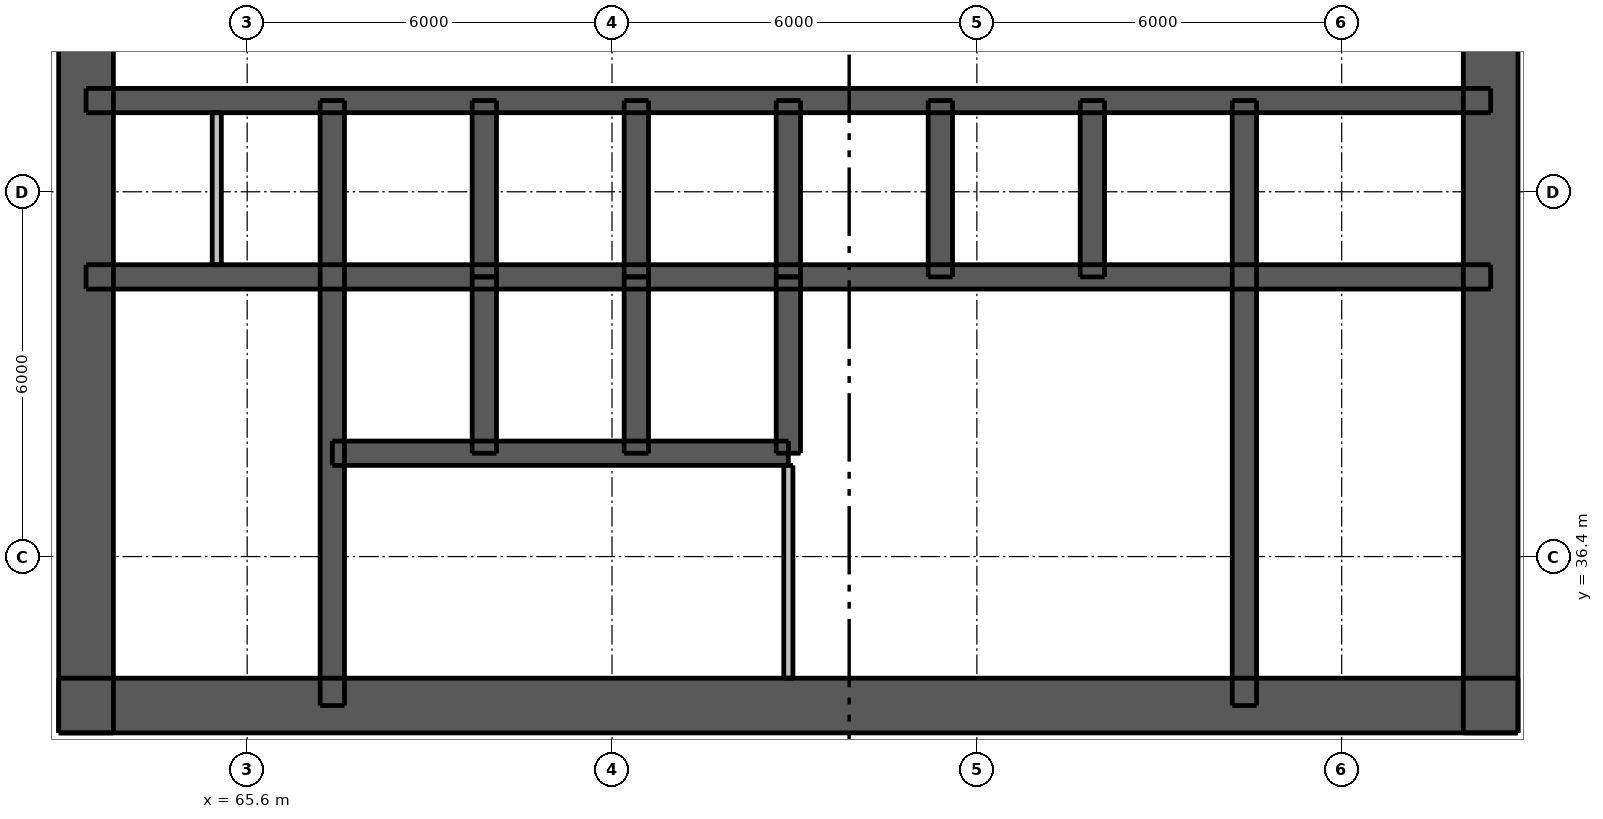
"""IFC4 building model, lengths in metres.
Left out: names, types, materials, properties, quantities, classifications, styles, units other than length and angle.
Written with IfcOpenShell. Run it as: python <this file> out.ifc"""

import sys

from ifc_helpers import new_model, si_unit, direction, frame, frame_2d, origin, place, context, subcontext, project, spatial, rectangle, extrude, element, fill, save


model = new_model("IFC4")
c1 = context("Model", 3, precision=1e-05, world=origin(), true_north=direction((0.0, 1.0)))
c2 = subcontext(c1, "Body", "Model", "MODEL_VIEW")
j1 = project(units=[si_unit("LENGTHUNIT", "METRE"), si_unit("PLANEANGLEUNIT", "RADIAN")], contexts=[c1])
p1 = place(None, origin())
s1 = spatial("IfcSite", under=j1, at=p1, CompositionType="ELEMENT")
p2 = place(p1, origin())
s2 = spatial("IfcBuilding", under=s1, at=p2, CompositionType="ELEMENT")
p3 = place(p2, frame((0.0, 0.0, 5.5)))
s3 = spatial("IfcBuildingStorey", under=s2, at=p3, CompositionType="ELEMENT", Elevation=5.5)
p4 = place(p3, frame((62.5, 33.95, 0.0), z_axis=(0.0, 0.0, 1.0), x_axis=(1.0, 0.0, 0.0)))
e1 = element("IfcWall", 1, at=p4, inside=s3, PredefinedType="SHEAR", context=c2, shape_type="SweptSolid", body=[
    extrude(rectangle(XDim=24.0, YDim=0.9, at=frame_2d((12.0, 0.0))), origin(), (0.0, 0.0, 1.0), 4.2),
])
p5 = place(p4, frame((2.05, 0.0, 0.0)))
e2 = element("IfcOpeningElement", 2, at=p5, cuts=e1, PredefinedType="OPENING", context=c2, shape_type="SweptSolid", body=[
    extrude(rectangle(XDim=1.1, YDim=2.1, at=frame_2d((0.55, 1.05))), frame((0.0, 0.46, 0.0), z_axis=(0.0, -1.0, 0.0), x_axis=(1.0, 0.0, 0.0)), (0.0, 0.0, 1.0), 0.92),
])
p6 = place(p4, frame((20.85, 0.0, 0.0)))
e3 = element("IfcOpeningElement", 3, at=p6, cuts=e1, PredefinedType="OPENING", context=c2, shape_type="SweptSolid", body=[
    extrude(rectangle(XDim=1.1, YDim=2.1, at=frame_2d((0.55, 1.05))), frame((0.0, 0.46, 0.0), z_axis=(0.0, -1.0, 0.0), x_axis=(1.0, 0.0, 0.0)), (0.0, 0.0, 1.0), 0.92),
])
p7 = place(p4, frame((8.0, 0.0, 0.0)))
e4 = element("IfcOpeningElement", 4, at=p7, cuts=e1, PredefinedType="OPENING", context=c2, shape_type="SweptSolid", body=[
    extrude(rectangle(XDim=1.1, YDim=2.1, at=frame_2d((0.55, 1.05))), frame((0.0, 0.46, 0.0), z_axis=(0.0, -1.0, 0.0), x_axis=(1.0, 0.0, 0.0)), (0.0, 0.0, 1.0), 0.92),
])
p8 = place(p4, frame((15.3, 0.0, 0.0)))
e5 = element("IfcOpeningElement", 5, at=p8, cuts=e1, PredefinedType="OPENING", context=c2, shape_type="SweptSolid", body=[
    extrude(rectangle(XDim=0.9, YDim=2.1, at=frame_2d((0.45, 1.05))), frame((0.0, 0.46, 0.0), z_axis=(0.0, -1.0, 0.0), x_axis=(1.0, 0.0, 0.0)), (0.0, 0.0, 1.0), 0.92),
])
p9 = place(p3, frame((62.95, 33.5, 0.0), z_axis=(0.0, 0.0, 1.0), x_axis=(0.0, 1.0, 0.0)))
e6 = element("IfcWall", 6, at=p9, inside=s3, PredefinedType="SHEAR", context=c2, shape_type="SweptSolid", body=[
    extrude(rectangle(XDim=24.0, YDim=0.9, at=frame_2d((12.0, 0.0))), origin(), (0.0, 0.0, 1.0), 4.2),
])
p10 = place(p9, frame((11.2, 0.0, 0.0)))
e7 = element("IfcOpeningElement", 7, at=p10, cuts=e6, PredefinedType="OPENING", context=c2, shape_type="SweptSolid", body=[
    extrude(rectangle(XDim=1.6, YDim=2.1, at=frame_2d((0.8, 1.05))), frame((0.0, 0.46, 0.0), z_axis=(0.0, -1.0, 0.0), x_axis=(1.0, 0.0, 0.0)), (0.0, 0.0, 1.0), 0.92),
])
p11 = place(p3, frame((86.05, 33.5, 0.0), z_axis=(0.0, 0.0, 1.0), x_axis=(0.0, 1.0, 0.0)))
e8 = element("IfcWall", 8, at=p11, inside=s3, PredefinedType="SHEAR", context=c2, shape_type="SweptSolid", body=[
    extrude(rectangle(XDim=24.0, YDim=0.9, at=frame_2d((12.0, 0.0))), origin(), (0.0, 0.0, 1.0), 4.2),
])
p12 = place(p11, frame((11.2, 0.0, 0.0)))
e9 = element("IfcOpeningElement", 9, at=p12, cuts=e8, PredefinedType="OPENING", context=c2, shape_type="SweptSolid", body=[
    extrude(rectangle(XDim=1.6, YDim=2.1, at=frame_2d((0.8, 1.05))), frame((0.0, 0.46, 0.0), z_axis=(0.0, -1.0, 0.0), x_axis=(1.0, 0.0, 0.0)), (0.0, 0.0, 1.0), 0.92),
])
p13 = place(p3, frame((62.95, 41.0, 0.0), z_axis=(0.0, 0.0, 1.0), x_axis=(1.0, 0.0, 0.0)))
e10 = element("IfcWall", 10, at=p13, inside=s3, PredefinedType="SHEAR", context=c2, shape_type="SweptSolid", body=[
    extrude(rectangle(XDim=23.1, YDim=0.4, at=frame_2d((11.55, 0.0))), origin(), (0.0, 0.0, 1.0), 4.2),
])
p14 = place(p3, frame((62.95, 43.9, 0.0), z_axis=(0.0, 0.0, 1.0), x_axis=(1.0, 0.0, 0.0)))
e11 = element("IfcWall", 11, at=p14, inside=s3, PredefinedType="SHEAR", context=c2, shape_type="SweptSolid", body=[
    extrude(rectangle(XDim=23.1, YDim=0.4, at=frame_2d((11.55, 0.0))), origin(), (0.0, 0.0, 1.0), 4.2),
])
p15 = place(p14, frame((0.85, 0.0, 0.0)))
e12 = element("IfcOpeningElement", 12, at=p15, cuts=e11, PredefinedType="OPENING", context=c2, shape_type="SweptSolid", body=[
    extrude(rectangle(XDim=0.9, YDim=2.1, at=frame_2d((0.45, 1.05))), frame((0.0, 0.21, 0.0), z_axis=(0.0, -1.0, 0.0), x_axis=(1.0, 0.0, 0.0)), (0.0, 0.0, 1.0), 0.42),
])
p16 = place(p14, frame((2.55, 0.0, 0.0)))
e13 = element("IfcOpeningElement", 13, at=p16, cuts=e11, PredefinedType="OPENING", context=c2, shape_type="SweptSolid", body=[
    extrude(rectangle(XDim=0.9, YDim=2.1, at=frame_2d((0.45, 1.05))), frame((0.0, 0.21, 0.0), z_axis=(0.0, -1.0, 0.0), x_axis=(1.0, 0.0, 0.0)), (0.0, 0.0, 1.0), 0.42),
])
p17 = place(p14, frame((20.5, 0.0, 0.0)))
e14 = element("IfcOpeningElement", 14, at=p17, cuts=e11, PredefinedType="OPENING", context=c2, shape_type="SweptSolid", body=[
    extrude(rectangle(XDim=0.9, YDim=2.1, at=frame_2d((0.45, 1.05))), frame((0.0, 0.21, 0.0), z_axis=(0.0, -1.0, 0.0), x_axis=(1.0, 0.0, 0.0)), (0.0, 0.0, 1.0), 0.42),
])
p18 = place(p14, frame((4.75, 0.0, 0.0)))
e15 = element("IfcOpeningElement", 15, at=p18, cuts=e11, PredefinedType="OPENING", context=c2, shape_type="SweptSolid", body=[
    extrude(rectangle(XDim=1.1, YDim=2.1, at=frame_2d((0.55, 1.05))), frame((0.0, 0.21, 0.0), z_axis=(0.0, -1.0, 0.0), x_axis=(1.0, 0.0, 0.0)), (0.0, 0.0, 1.0), 0.42),
])
p19 = place(p14, frame((7.25, 0.0, 0.0)))
e16 = element("IfcOpeningElement", 16, at=p19, cuts=e11, PredefinedType="OPENING", context=c2, shape_type="SweptSolid", body=[
    extrude(rectangle(XDim=1.1, YDim=2.1, at=frame_2d((0.55, 1.05))), frame((0.0, 0.21, 0.0), z_axis=(0.0, -1.0, 0.0), x_axis=(1.0, 0.0, 0.0)), (0.0, 0.0, 1.0), 0.42),
])
p20 = place(p14, frame((9.75, 0.0, 0.0)))
e17 = element("IfcOpeningElement", 17, at=p20, cuts=e11, PredefinedType="OPENING", context=c2, shape_type="SweptSolid", body=[
    extrude(rectangle(XDim=1.1, YDim=2.1, at=frame_2d((0.55, 1.05))), frame((0.0, 0.21, 0.0), z_axis=(0.0, -1.0, 0.0), x_axis=(1.0, 0.0, 0.0)), (0.0, 0.0, 1.0), 0.42),
])
p21 = place(p14, frame((12.25, 0.0, 0.0)))
e18 = element("IfcOpeningElement", 18, at=p21, cuts=e11, PredefinedType="OPENING", context=c2, shape_type="SweptSolid", body=[
    extrude(rectangle(XDim=1.1, YDim=2.1, at=frame_2d((0.55, 1.05))), frame((0.0, 0.21, 0.0), z_axis=(0.0, -1.0, 0.0), x_axis=(1.0, 0.0, 0.0)), (0.0, 0.0, 1.0), 0.42),
])
p22 = place(p14, frame((14.75, 0.0, 0.0)))
e19 = element("IfcOpeningElement", 19, at=p22, cuts=e11, PredefinedType="OPENING", context=c2, shape_type="SweptSolid", body=[
    extrude(rectangle(XDim=1.1, YDim=2.1, at=frame_2d((0.55, 1.05))), frame((0.0, 0.21, 0.0), z_axis=(0.0, -1.0, 0.0), x_axis=(1.0, 0.0, 0.0)), (0.0, 0.0, 1.0), 0.42),
])
p23 = place(p14, frame((17.25, 0.0, 0.0)))
e20 = element("IfcOpeningElement", 20, at=p23, cuts=e11, PredefinedType="OPENING", context=c2, shape_type="SweptSolid", body=[
    extrude(rectangle(XDim=1.1, YDim=2.1, at=frame_2d((0.55, 1.05))), frame((0.0, 0.21, 0.0), z_axis=(0.0, -1.0, 0.0), x_axis=(1.0, 0.0, 0.0)), (0.0, 0.0, 1.0), 0.42),
])
p24 = place(p3, frame((67.0, 33.95, 0.0), z_axis=(0.0, 0.0, 1.0), x_axis=(0.0, 1.0, 0.0)))
e21 = element("IfcWall", 21, at=p24, inside=s3, PredefinedType="SHEAR", context=c2, shape_type="SweptSolid", body=[
    extrude(rectangle(XDim=9.95, YDim=0.4, at=frame_2d((4.975, 0.0))), origin(), (0.0, 0.0, 1.0), 4.2),
])
p25 = place(p24, frame((0.65, 0.0, 0.0)))
e22 = element("IfcOpeningElement", 22, at=p25, cuts=e21, PredefinedType="OPENING", context=c2, shape_type="SweptSolid", body=[
    extrude(rectangle(XDim=1.1, YDim=2.1, at=frame_2d((0.55, 1.05))), frame((0.0, 0.21, 0.0), z_axis=(0.0, -1.0, 0.0), x_axis=(1.0, 0.0, 0.0)), (0.0, 0.0, 1.0), 0.42),
])
p26 = place(p3, frame((82.0, 33.95, 0.0), z_axis=(0.0, 0.0, 1.0), x_axis=(0.0, 1.0, 0.0)))
e23 = element("IfcWall", 23, at=p26, inside=s3, PredefinedType="SHEAR", context=c2, shape_type="SweptSolid", body=[
    extrude(rectangle(XDim=9.95, YDim=0.4, at=frame_2d((4.975, 0.0))), origin(), (0.0, 0.0, 1.0), 4.2),
])
for number, where, z_axis, x_axis in (
    (24, (69.5, 41.0, 0.0), (0.0, 0.0, 1.0), (0.0, 1.0, 0.0)),
    (25, (72.0, 41.0, 0.0), (0.0, 0.0, 1.0), (0.0, 1.0, 0.0)),
    (26, (74.5, 41.0, 0.0), (0.0, 0.0, 1.0), (0.0, 1.0, 0.0)),
    (27, (77.0, 41.0, 0.0), (0.0, 0.0, 1.0), (0.0, 1.0, 0.0)),
    (28, (79.5, 41.0, 0.0), (0.0, 0.0, 1.0), (0.0, 1.0, 0.0)),
):
    element("IfcWall", number, at=place(p3, frame(where, z_axis=z_axis, x_axis=x_axis)), inside=s3, PredefinedType="SHEAR", context=c2, shape_type="SweptSolid", body=[
        extrude(rectangle(XDim=2.9, YDim=0.4, at=frame_2d((1.45, 0.0))), origin(), (0.0, 0.0, 1.0), 4.2),
    ])
p27 = place(p3, frame((67.0, 38.1, 0.0), z_axis=(0.0, 0.0, 1.0), x_axis=(1.0, 0.0, 0.0)))
e29 = element("IfcWall", 29, at=p27, inside=s3, PredefinedType="SHEAR", context=c2, shape_type="SweptSolid", body=[
    extrude(rectangle(XDim=7.5, YDim=0.4, at=frame_2d((3.75, 0.0))), origin(), (0.0, 0.0, 1.0), 4.2),
])
p28 = place(p27, frame((0.7, 0.0, 0.0)))
e30 = element("IfcOpeningElement", 30, at=p28, cuts=e29, PredefinedType="OPENING", context=c2, shape_type="SweptSolid", body=[
    extrude(rectangle(XDim=1.1, YDim=2.1, at=frame_2d((0.55, 1.05))), frame((0.0, 0.21, 0.0), z_axis=(0.0, -1.0, 0.0), x_axis=(1.0, 0.0, 0.0)), (0.0, 0.0, 1.0), 0.42),
])
p29 = place(p27, frame((3.2, 0.0, 0.0)))
e31 = element("IfcOpeningElement", 31, at=p29, cuts=e29, PredefinedType="OPENING", context=c2, shape_type="SweptSolid", body=[
    extrude(rectangle(XDim=1.1, YDim=2.1, at=frame_2d((0.55, 1.05))), frame((0.0, 0.21, 0.0), z_axis=(0.0, -1.0, 0.0), x_axis=(1.0, 0.0, 0.0)), (0.0, 0.0, 1.0), 0.42),
])
p30 = place(p27, frame((5.65, 0.0, 0.0)))
e32 = element("IfcOpeningElement", 32, at=p30, cuts=e29, PredefinedType="OPENING", context=c2, shape_type="SweptSolid", body=[
    extrude(rectangle(XDim=1.2, YDim=2.1, at=frame_2d((0.6, 1.05))), frame((0.0, 0.21, 0.0), z_axis=(0.0, -1.0, 0.0), x_axis=(1.0, 0.0, 0.0)), (0.0, 0.0, 1.0), 0.42),
])
for number, where, z_axis, x_axis in (
    (33, (69.5, 38.1, 0.0), (0.0, 0.0, 1.0), (0.0, 1.0, 0.0)),
    (34, (72.0, 38.1, 0.0), (0.0, 0.0, 1.0), (0.0, 1.0, 0.0)),
    (35, (74.5, 38.1, 0.0), (0.0, 0.0, 1.0), (0.0, 1.0, 0.0)),
):
    element("IfcWall", number, at=place(p3, frame(where, z_axis=z_axis, x_axis=x_axis)), inside=s3, PredefinedType="SHEAR", context=c2, shape_type="SweptSolid", body=[
        extrude(rectangle(XDim=2.9, YDim=0.4, at=frame_2d((1.45, 0.0))), origin(), (0.0, 0.0, 1.0), 4.2),
    ])
p31 = place(p3, frame((74.5, 34.4, 0.0), z_axis=(0.0, 0.0, 1.0), x_axis=(0.0, 1.0, 0.0)))
e36 = element("IfcWall", 36, at=p31, inside=s3, PredefinedType="PLUMBINGWALL", context=c2, shape_type="SweptSolid", body=[
    extrude(rectangle(XDim=3.5, YDim=0.15, at=frame_2d((1.75, 0.0))), origin(), (0.0, 0.0, 1.0), 4.2),
])
p32 = place(p3, frame((65.1, 41.2, 0.0), z_axis=(0.0, 0.0, 1.0), x_axis=(0.0, 1.0, 0.0)))
e37 = element("IfcWall", 37, at=p32, inside=s3, PredefinedType="PLUMBINGWALL", context=c2, shape_type="SweptSolid", body=[
    extrude(rectangle(XDim=2.5, YDim=0.15, at=frame_2d((1.25, 0.0))), origin(), (0.0, 0.0, 1.0), 4.2),
])
p33 = place(p5, origin())
e38 = element("IfcDoor", 38, at=p33, inside=s3, OperationType="SINGLE_SWING_LEFT", PredefinedType="DOOR", context=c2, shape_type="SweptSolid", body=[
    extrude(rectangle(XDim=1.1, YDim=2.1, at=frame_2d((0.55, 1.05))), frame((0.0, 0.438, 0.0), z_axis=(0.0, -1.0, 0.0), x_axis=(1.0, 0.0, 0.0)), (0.0, 0.0, 1.0), 0.05),
])
fill(e2, e38)
p34 = place(p6, origin())
e39 = element("IfcDoor", 39, at=p34, inside=s3, OperationType="SINGLE_SWING_RIGHT", PredefinedType="DOOR", context=c2, shape_type="SweptSolid", body=[
    extrude(rectangle(XDim=1.1, YDim=2.1, at=frame_2d((0.55, 1.05))), frame((0.0, 0.438, 0.0), z_axis=(0.0, -1.0, 0.0), x_axis=(1.0, 0.0, 0.0)), (0.0, 0.0, 1.0), 0.05),
])
fill(e3, e39)
p35 = place(p7, origin())
e40 = element("IfcDoor", 40, at=p35, inside=s3, OperationType="SINGLE_SWING_LEFT", PredefinedType="DOOR", context=c2, shape_type="SweptSolid", body=[
    extrude(rectangle(XDim=1.1, YDim=2.1, at=frame_2d((0.55, 1.05))), frame((0.0, 0.438, 0.0), z_axis=(0.0, -1.0, 0.0), x_axis=(1.0, 0.0, 0.0)), (0.0, 0.0, 1.0), 0.05),
])
fill(e4, e40)
p36 = place(p25, origin())
e41 = element("IfcDoor", 41, at=p36, inside=s3, OperationType="SINGLE_SWING_RIGHT", PredefinedType="DOOR", context=c2, shape_type="SweptSolid", body=[
    extrude(rectangle(XDim=1.1, YDim=2.1, at=frame_2d((0.55, 1.05))), frame((0.0, -0.138, 0.0), z_axis=(0.0, -1.0, 0.0), x_axis=(1.0, 0.0, 0.0)), (0.0, 0.0, 1.0), 0.05),
])
fill(e22, e41)
p37 = place(p8, origin())
e42 = element("IfcDoor", 42, at=p37, inside=s3, OperationType="SINGLE_SWING_LEFT", PredefinedType="DOOR", context=c2, shape_type="SweptSolid", body=[
    extrude(rectangle(XDim=0.9, YDim=2.1, at=frame_2d((0.45, 1.05))), frame((0.0, 0.438, 0.0), z_axis=(0.0, -1.0, 0.0), x_axis=(1.0, 0.0, 0.0)), (0.0, 0.0, 1.0), 0.05),
])
fill(e5, e42)
p38 = place(p15, origin())
e43 = element("IfcDoor", 43, at=p38, inside=s3, OperationType="SINGLE_SWING_LEFT", PredefinedType="DOOR", context=c2, shape_type="SweptSolid", body=[
    extrude(rectangle(XDim=0.9, YDim=2.1, at=frame_2d((0.45, 1.05))), frame((0.0, -0.138, 0.0), z_axis=(0.0, -1.0, 0.0), x_axis=(1.0, 0.0, 0.0)), (0.0, 0.0, 1.0), 0.05),
])
fill(e12, e43)
p39 = place(p16, origin())
e44 = element("IfcDoor", 44, at=p39, inside=s3, OperationType="SINGLE_SWING_RIGHT", PredefinedType="DOOR", context=c2, shape_type="SweptSolid", body=[
    extrude(rectangle(XDim=0.9, YDim=2.1, at=frame_2d((0.45, 1.05))), frame((0.0, -0.138, 0.0), z_axis=(0.0, -1.0, 0.0), x_axis=(1.0, 0.0, 0.0)), (0.0, 0.0, 1.0), 0.05),
])
fill(e13, e44)
p40 = place(p17, origin())
e45 = element("IfcDoor", 45, at=p40, inside=s3, OperationType="SINGLE_SWING_LEFT", PredefinedType="DOOR", context=c2, shape_type="SweptSolid", body=[
    extrude(rectangle(XDim=0.9, YDim=2.1, at=frame_2d((0.45, 1.05))), frame((0.0, -0.138, 0.0), z_axis=(0.0, -1.0, 0.0), x_axis=(1.0, 0.0, 0.0)), (0.0, 0.0, 1.0), 0.05),
])
fill(e14, e45)
p41 = place(p18, origin())
e46 = element("IfcDoor", 46, at=p41, inside=s3, OperationType="DOUBLE_DOOR_SLIDING", PredefinedType="DOOR", context=c2, shape_type="SweptSolid", body=[
    extrude(rectangle(XDim=1.1, YDim=2.1, at=frame_2d((0.55, 1.05))), frame((0.0, 0.025, 0.0), z_axis=(0.0, -1.0, 0.0), x_axis=(1.0, 0.0, 0.0)), (0.0, 0.0, 1.0), 0.05),
])
fill(e15, e46)
p42 = place(p19, origin())
e47 = element("IfcDoor", 47, at=p42, inside=s3, OperationType="DOUBLE_DOOR_SLIDING", PredefinedType="DOOR", context=c2, shape_type="SweptSolid", body=[
    extrude(rectangle(XDim=1.1, YDim=2.1, at=frame_2d((0.55, 1.05))), frame((0.0, 0.025, 0.0), z_axis=(0.0, -1.0, 0.0), x_axis=(1.0, 0.0, 0.0)), (0.0, 0.0, 1.0), 0.05),
])
fill(e16, e47)
p43 = place(p20, origin())
e48 = element("IfcDoor", 48, at=p43, inside=s3, OperationType="DOUBLE_DOOR_SLIDING", PredefinedType="DOOR", context=c2, shape_type="SweptSolid", body=[
    extrude(rectangle(XDim=1.1, YDim=2.1, at=frame_2d((0.55, 1.05))), frame((0.0, 0.025, 0.0), z_axis=(0.0, -1.0, 0.0), x_axis=(1.0, 0.0, 0.0)), (0.0, 0.0, 1.0), 0.05),
])
fill(e17, e48)
p44 = place(p21, origin())
e49 = element("IfcDoor", 49, at=p44, inside=s3, OperationType="DOUBLE_DOOR_SLIDING", PredefinedType="DOOR", context=c2, shape_type="SweptSolid", body=[
    extrude(rectangle(XDim=1.1, YDim=2.1, at=frame_2d((0.55, 1.05))), frame((0.0, 0.025, 0.0), z_axis=(0.0, -1.0, 0.0), x_axis=(1.0, 0.0, 0.0)), (0.0, 0.0, 1.0), 0.05),
])
fill(e18, e49)
p45 = place(p22, origin())
e50 = element("IfcDoor", 50, at=p45, inside=s3, OperationType="DOUBLE_DOOR_SLIDING", PredefinedType="DOOR", context=c2, shape_type="SweptSolid", body=[
    extrude(rectangle(XDim=1.1, YDim=2.1, at=frame_2d((0.55, 1.05))), frame((0.0, 0.025, 0.0), z_axis=(0.0, -1.0, 0.0), x_axis=(1.0, 0.0, 0.0)), (0.0, 0.0, 1.0), 0.05),
])
fill(e19, e50)
p46 = place(p23, origin())
e51 = element("IfcDoor", 51, at=p46, inside=s3, OperationType="DOUBLE_DOOR_SLIDING", PredefinedType="DOOR", context=c2, shape_type="SweptSolid", body=[
    extrude(rectangle(XDim=1.1, YDim=2.1, at=frame_2d((0.55, 1.05))), frame((0.0, 0.025, 0.0), z_axis=(0.0, -1.0, 0.0), x_axis=(1.0, 0.0, 0.0)), (0.0, 0.0, 1.0), 0.05),
])
fill(e20, e51)
p47 = place(p28, origin())
e52 = element("IfcDoor", 52, at=p47, inside=s3, OperationType="DOUBLE_DOOR_SLIDING", PredefinedType="DOOR", context=c2, shape_type="SweptSolid", body=[
    extrude(rectangle(XDim=1.1, YDim=2.1, at=frame_2d((0.55, 1.05))), frame((0.0, 0.025, 0.0), z_axis=(0.0, -1.0, 0.0), x_axis=(1.0, 0.0, 0.0)), (0.0, 0.0, 1.0), 0.05),
])
fill(e30, e52)
p48 = place(p29, origin())
e53 = element("IfcDoor", 53, at=p48, inside=s3, OperationType="DOUBLE_DOOR_SLIDING", PredefinedType="DOOR", context=c2, shape_type="SweptSolid", body=[
    extrude(rectangle(XDim=1.1, YDim=2.1, at=frame_2d((0.55, 1.05))), frame((0.0, 0.025, 0.0), z_axis=(0.0, -1.0, 0.0), x_axis=(1.0, 0.0, 0.0)), (0.0, 0.0, 1.0), 0.05),
])
fill(e31, e53)
p49 = place(p30, origin())
e54 = element("IfcDoor", 54, at=p49, inside=s3, OperationType="DOUBLE_DOOR_SLIDING", PredefinedType="DOOR", context=c2, shape_type="SweptSolid", body=[
    extrude(rectangle(XDim=1.2, YDim=2.1, at=frame_2d((0.6, 1.05))), frame((0.0, 0.025, 0.0), z_axis=(0.0, -1.0, 0.0), x_axis=(1.0, 0.0, 0.0)), (0.0, 0.0, 1.0), 0.05),
])
fill(e32, e54)
save(model, sys.argv[1])
